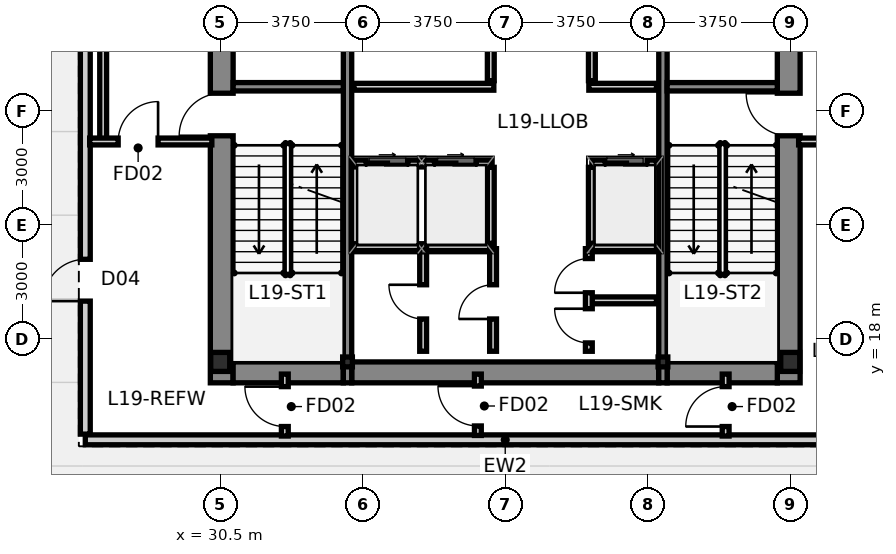
"""IFC4 building model, lengths in metres.
Left out: names, types, materials, properties, quantities, classifications, styles, units other than length and angle.
Written with IfcOpenShell. Run it as: python <this file> out.ifc"""

import sys

from ifc_helpers import new_model, si_unit, direction, frame, frame_2d, origin, origin_2d, place, context, subcontext, project, spatial, rectangle, i_section, extrude, source, transform, mapped, element, fill, save


model = new_model("IFC4")
c1 = context("Model", 3, precision=1e-05, world=origin(), true_north=direction((0.0, 1.0)))
c2 = subcontext(c1, "Body", "Model", "MODEL_VIEW")
j1 = project(units=[si_unit("LENGTHUNIT", "METRE"), si_unit("PLANEANGLEUNIT", "RADIAN")], contexts=[c1])
p1 = place(None, origin())
s1 = spatial("IfcSite", under=j1, at=p1, CompositionType="ELEMENT")
p2 = place(p1, origin())
s2 = spatial("IfcBuilding", under=s1, at=p2, CompositionType="ELEMENT")
p3 = place(p2, frame((0.0, 0.0, 75.05)))
s3 = spatial("IfcBuildingStorey", under=s2, at=p3, CompositionType="ELEMENT", Elevation=75.05)
m1 = source(origin(), c2, "Body", "SweptSolid", [
    extrude(i_section(OverallWidth=0.5, OverallDepth=0.5, WebThickness=0.028, FlangeThickness=0.04, at=origin_2d()), origin(), (0.0, 0.0, 1.0), 4.8),
])
for number, where, z_axis, x_axis in (
    (1, (30.5, 17.4, 0.0), (0.0, 0.0, 1.0), (1.0, 0.0, 0.0)),
    (2, (45.5, 17.4, 0.0), (0.0, 0.0, 1.0), (1.0, 0.0, 0.0)),
):
    element("IfcColumn", number, at=place(p3, frame(where, z_axis=z_axis, x_axis=x_axis)), inside=s3, PredefinedType="COLUMN", context=c2, shape_type="MappedRepresentation", body=[
        mapped(m1, transform((0.0, 0.0, 0.0), scale=1.0)),
    ])
m2 = source(origin(), c2, "Body", "SweptSolid", [
    extrude(i_section(OverallWidth=0.256, OverallDepth=0.26, WebThickness=0.01, FlangeThickness=0.017, at=origin_2d()), origin(), (0.0, 0.0, 1.0), 4.8),
])
for number, where, z_axis, x_axis in (
    (3, (33.85, 17.4, 0.0), (0.0, 0.0, 1.0), (1.0, 0.0, 0.0)),
    (4, (42.15, 17.4, 0.0), (0.0, 0.0, 1.0), (1.0, 0.0, 0.0)),
):
    element("IfcColumn", number, at=place(p3, frame(where, z_axis=z_axis, x_axis=x_axis)), inside=s3, PredefinedType="COLUMN", context=c2, shape_type="MappedRepresentation", body=[
        mapped(m2, transform((0.0, 0.0, 0.0), scale=1.0)),
    ])
p4 = place(p3, frame((30.54, 16.85, 0.0), z_axis=(0.0, 0.0, 1.0), x_axis=(0.0, 1.0, 0.0)))
e5 = element("IfcWall", 5, at=p4, inside=s3, PredefinedType="SHEAR", context=c2, shape_type="SweptSolid", body=[
    extrude(rectangle(XDim=13.425, YDim=0.6, at=frame_2d((6.712, 0.0))), origin(), (0.0, 0.0, 1.0), 4.8),
])
p5 = place(p4, frame((6.5, 0.0, 0.0)))
e6 = element("IfcOpeningElement", 6, at=p5, cuts=e5, PredefinedType="OPENING", context=c2, shape_type="SweptSolid", body=[
    extrude(rectangle(XDim=1.12, YDim=2.15, at=frame_2d((0.56, 1.075))), frame((0.0, 0.312, 0.0), z_axis=(0.0, -1.0, 0.0), x_axis=(1.0, 0.0, 0.0)), (0.0, 0.0, 1.0), 0.624),
])
p6 = place(p4, frame((10.95, 0.0, 0.0)))
e7 = element("IfcOpeningElement", 7, at=p6, cuts=e5, PredefinedType="OPENING", context=c2, shape_type="SweptSolid", body=[
    extrude(rectangle(XDim=1.2, YDim=2.2, at=frame_2d((0.6, 1.1))), frame((0.0, 0.312, 0.0), z_axis=(0.0, -1.0, 0.0), x_axis=(1.0, 0.0, 0.0)), (0.0, 0.0, 1.0), 0.624),
])
p7 = place(p3, frame((45.46, 16.85, 0.0), z_axis=(0.0, 0.0, 1.0), x_axis=(0.0, 1.0, 0.0)))
e8 = element("IfcWall", 8, at=p7, inside=s3, PredefinedType="SHEAR", context=c2, shape_type="SweptSolid", body=[
    extrude(rectangle(XDim=13.425, YDim=0.6, at=frame_2d((6.712, 0.0))), origin(), (0.0, 0.0, 1.0), 4.8),
])
p8 = place(p7, frame((6.5, 0.0, 0.0)))
e9 = element("IfcOpeningElement", 9, at=p8, cuts=e8, PredefinedType="OPENING", context=c2, shape_type="SweptSolid", body=[
    extrude(rectangle(XDim=1.12, YDim=2.15, at=frame_2d((0.56, 1.075))), frame((0.0, 0.312, 0.0), z_axis=(0.0, -1.0, 0.0), x_axis=(1.0, 0.0, 0.0)), (0.0, 0.0, 1.0), 0.624),
])
p9 = place(p7, frame((10.95, 0.0, 0.0)))
e10 = element("IfcOpeningElement", 10, at=p9, cuts=e8, PredefinedType="OPENING", context=c2, shape_type="SweptSolid", body=[
    extrude(rectangle(XDim=1.2, YDim=2.2, at=frame_2d((0.6, 1.1))), frame((0.0, 0.312, 0.0), z_axis=(0.0, -1.0, 0.0), x_axis=(1.0, 0.0, 0.0)), (0.0, 0.0, 1.0), 0.624),
])
p10 = place(p3, frame((30.84, 17.125, 0.0), z_axis=(0.0, 0.0, 1.0), x_axis=(1.0, 0.0, 0.0)))
e11 = element("IfcWall", 11, at=p10, inside=s3, PredefinedType="SHEAR", context=c2, shape_type="SweptSolid", body=[
    extrude(rectangle(XDim=2.9, YDim=0.55, at=frame_2d((1.45, 0.0))), origin(), (0.0, 0.0, 1.0), 4.8),
])
p11 = place(p3, frame((33.96, 17.125, 0.0), z_axis=(0.0, 0.0, 1.0), x_axis=(1.0, 0.0, 0.0)))
e12 = element("IfcWall", 12, at=p11, inside=s3, PredefinedType="SHEAR", context=c2, shape_type="SweptSolid", body=[
    extrude(rectangle(XDim=8.08, YDim=0.55, at=frame_2d((4.04, 0.0))), origin(), (0.0, 0.0, 1.0), 4.8),
])
p12 = place(p3, frame((42.26, 17.125, 0.0), z_axis=(0.0, 0.0, 1.0), x_axis=(1.0, 0.0, 0.0)))
e13 = element("IfcWall", 13, at=p12, inside=s3, PredefinedType="SHEAR", context=c2, shape_type="SweptSolid", body=[
    extrude(rectangle(XDim=2.9, YDim=0.55, at=frame_2d((1.45, 0.0))), origin(), (0.0, 0.0, 1.0), 4.8),
])
for number, where, z_axis, x_axis in (
    (14, (33.85, 16.85, 0.0), (0.0, 0.0, 1.0), (0.0, 1.0, 0.0)),
    (15, (42.15, 16.85, 0.0), (0.0, 0.0, 1.0), (0.0, 1.0, 0.0)),
):
    element("IfcWall", number, at=place(p3, frame(where, z_axis=z_axis, x_axis=x_axis)), inside=s3, PredefinedType="SHEAR", context=c2, shape_type="SweptSolid", body=[
        extrude(rectangle(XDim=13.425, YDim=0.22, at=frame_2d((6.712, 0.0))), origin(), (0.0, 0.0, 1.0), 4.8),
    ])
for number, where, z_axis, x_axis in (
    (16, (30.84, 24.64, 0.0), (0.0, 0.0, 1.0), (1.0, 0.0, 0.0)),
    (17, (42.26, 24.64, 0.0), (0.0, 0.0, 1.0), (1.0, 0.0, 0.0)),
):
    element("IfcWall", number, at=place(p3, frame(where, z_axis=z_axis, x_axis=x_axis)), inside=s3, PredefinedType="SHEAR", context=c2, shape_type="SweptSolid", body=[
        extrude(rectangle(XDim=2.9, YDim=0.22, at=frame_2d((1.45, 0.0))), origin(), (0.0, 0.0, 1.0), 4.8),
    ])
p13 = place(p3, frame((26.95, 15.35, 0.0), z_axis=(0.0, 0.0, 1.0), x_axis=(1.0, 0.0, 0.0)))
e18 = element("IfcWall", 18, at=p13, inside=s3, PredefinedType="STANDARD", context=c2, shape_type="SweptSolid", body=[
    extrude(rectangle(XDim=22.1, YDim=0.26, at=frame_2d((11.05, 0.0))), origin(), (0.0, 0.0, 1.0), 4.176),
])
p14 = place(p3, frame((26.95, 15.5, 0.0), z_axis=(0.0, 0.0, 1.0), x_axis=(0.0, 1.0, 0.0)))
e19 = element("IfcWall", 19, at=p14, inside=s3, PredefinedType="STANDARD", context=c2, shape_type="SweptSolid", body=[
    extrude(rectangle(XDim=17.0, YDim=0.26, at=frame_2d((8.5, 0.0))), origin(), (0.0, 0.0, 1.0), 4.176),
])
p15 = place(p14, frame((3.5, 0.0, 0.0)))
e20 = element("IfcOpeningElement", 20, at=p15, cuts=e19, PredefinedType="OPENING", context=c2, shape_type="SweptSolid", body=[
    extrude(rectangle(XDim=1.1, YDim=2.2, at=frame_2d((0.55, 1.1))), frame((0.0, 0.142, 0.0), z_axis=(0.0, -1.0, 0.0), x_axis=(1.0, 0.0, 0.0)), (0.0, 0.0, 1.0), 0.284),
])
p16 = place(p3, frame((34.02, 22.62, 0.0), z_axis=(0.0, 0.0, 1.0), x_axis=(1.0, 0.0, 0.0)))
e21 = element("IfcWall", 21, at=p16, inside=s3, PredefinedType="PARTITIONING", context=c2, shape_type="SweptSolid", body=[
    extrude(rectangle(XDim=3.6, YDim=0.18, at=frame_2d((1.8, 0.0))), origin(), (0.0, 0.0, 1.0), 4.55),
])
p17 = place(p16, frame((0.32, 0.0, 0.0)))
e22 = element("IfcOpeningElement", 22, at=p17, cuts=e21, PredefinedType="OPENING", context=c2, shape_type="SweptSolid", body=[
    extrude(rectangle(XDim=1.1, YDim=2.2, at=frame_2d((0.55, 1.1))), frame((0.0, 0.102, 0.0), z_axis=(0.0, -1.0, 0.0), x_axis=(1.0, 0.0, 0.0)), (0.0, 0.0, 1.0), 0.204),
])
p18 = place(p16, frame((2.12, 0.0, 0.0)))
e23 = element("IfcOpeningElement", 23, at=p18, cuts=e21, PredefinedType="OPENING", context=c2, shape_type="SweptSolid", body=[
    extrude(rectangle(XDim=1.1, YDim=2.2, at=frame_2d((0.55, 1.1))), frame((0.0, 0.102, 0.0), z_axis=(0.0, -1.0, 0.0), x_axis=(1.0, 0.0, 0.0)), (0.0, 0.0, 1.0), 0.204),
])
p19 = place(p3, frame((40.28, 22.62, 0.0), z_axis=(0.0, 0.0, 1.0), x_axis=(1.0, 0.0, 0.0)))
e24 = element("IfcWall", 24, at=p19, inside=s3, PredefinedType="PARTITIONING", context=c2, shape_type="SweptSolid", body=[
    extrude(rectangle(XDim=1.7, YDim=0.18, at=frame_2d((0.85, 0.0))), origin(), (0.0, 0.0, 1.0), 4.55),
])
p20 = place(p19, frame((0.35, 0.0, 0.0)))
e25 = element("IfcOpeningElement", 25, at=p20, cuts=e24, PredefinedType="OPENING", context=c2, shape_type="SweptSolid", body=[
    extrude(rectangle(XDim=1.1, YDim=2.2, at=frame_2d((0.55, 1.1))), frame((0.0, 0.102, 0.0), z_axis=(0.0, -1.0, 0.0), x_axis=(1.0, 0.0, 0.0)), (0.0, 0.0, 1.0), 0.204),
])
for number, where, z_axis, x_axis in (
    (26, (37.62, 20.52, 0.0), (0.0, 0.0, 1.0), (0.0, 1.0, 0.0)),
    (27, (40.28, 20.52, 0.0), (0.0, 0.0, 1.0), (0.0, 1.0, 0.0)),
    (28, (37.62, 24.8, 0.0), (0.0, 0.0, 1.0), (0.0, 1.0, 0.0)),
    (29, (40.28, 24.8, 0.0), (0.0, 0.0, 1.0), (0.0, 1.0, 0.0)),
):
    element("IfcWall", number, at=place(p3, frame(where, z_axis=z_axis, x_axis=x_axis)), inside=s3, PredefinedType="PARTITIONING", context=c2, shape_type="SweptSolid", body=[
        extrude(rectangle(XDim=2.0, YDim=0.18, at=frame_2d((1.0, 0.0))), origin(), (0.0, 0.0, 1.0), 4.55),
    ])
p21 = place(p3, frame((34.02, 24.64, 0.0), z_axis=(0.0, 0.0, 1.0), x_axis=(1.0, 0.0, 0.0)))
e30 = element("IfcWall", 30, at=p21, inside=s3, PredefinedType="PARTITIONING", context=c2, shape_type="SweptSolid", body=[
    extrude(rectangle(XDim=3.68, YDim=0.18, at=frame_2d((1.84, 0.0))), origin(), (0.0, 0.0, 1.0), 4.55),
])
p22 = place(p3, frame((40.2, 24.64, 0.0), z_axis=(0.0, 0.0, 1.0), x_axis=(1.0, 0.0, 0.0)))
e31 = element("IfcWall", 31, at=p22, inside=s3, PredefinedType="PARTITIONING", context=c2, shape_type="SweptSolid", body=[
    extrude(rectangle(XDim=1.78, YDim=0.18, at=frame_2d((0.89, 0.0))), origin(), (0.0, 0.0, 1.0), 4.55),
])
p23 = place(p3, frame((27.42, 23.2, 0.0), z_axis=(0.0, 0.0, 1.0), x_axis=(0.0, 1.0, 0.0)))
e32 = element("IfcWall", 32, at=p23, inside=s3, PredefinedType="PARTITIONING", context=c2, shape_type="SweptSolid", body=[
    extrude(rectangle(XDim=6.4, YDim=0.18, at=frame_2d((3.2, 0.0))), origin(), (0.0, 0.0, 1.0), 4.176),
])
p24 = place(p3, frame((27.065, 23.2, 0.0), z_axis=(0.0, 0.0, 1.0), x_axis=(1.0, 0.0, 0.0)))
e33 = element("IfcWall", 33, at=p24, inside=s3, PredefinedType="PARTITIONING", context=c2, shape_type="SweptSolid", body=[
    extrude(rectangle(XDim=3.215, YDim=0.18, at=frame_2d((1.607, 0.0))), origin(), (0.0, 0.0, 1.0), 4.55),
])
p25 = place(p24, frame((0.75, 0.0, 0.0)))
e34 = element("IfcOpeningElement", 34, at=p25, cuts=e33, PredefinedType="OPENING", context=c2, shape_type="SweptSolid", body=[
    extrude(rectangle(XDim=1.05, YDim=2.15, at=frame_2d((0.525, 1.075))), frame((0.0, 0.102, 0.0), z_axis=(0.0, -1.0, 0.0), x_axis=(1.0, 0.0, 0.0)), (0.0, 0.0, 1.0), 0.204),
])
p26 = place(p3, frame((45.72, 23.2, 0.0), z_axis=(0.0, 0.0, 1.0), x_axis=(1.0, 0.0, 0.0)))
e35 = element("IfcWall", 35, at=p26, inside=s3, PredefinedType="PARTITIONING", context=c2, shape_type="SweptSolid", body=[
    extrude(rectangle(XDim=3.215, YDim=0.18, at=frame_2d((1.607, 0.0))), origin(), (0.0, 0.0, 1.0), 4.55),
])
p27 = place(p26, frame((0.75, 0.0, 0.0)))
e36 = element("IfcOpeningElement", 36, at=p27, cuts=e35, PredefinedType="OPENING", context=c2, shape_type="SweptSolid", body=[
    extrude(rectangle(XDim=1.05, YDim=2.15, at=frame_2d((0.525, 1.075))), frame((0.0, 0.102, 0.0), z_axis=(0.0, -1.0, 0.0), x_axis=(1.0, 0.0, 0.0)), (0.0, 0.0, 1.0), 0.204),
])
p28 = place(p3, frame((34.02, 20.42, 0.0), z_axis=(0.0, 0.0, 1.0), x_axis=(1.0, 0.0, 0.0)))
e37 = element("IfcWall", 37, at=p28, inside=s3, PredefinedType="PARTITIONING", context=c2, shape_type="SweptSolid", body=[
    extrude(rectangle(XDim=3.64, YDim=0.18, at=frame_2d((1.82, 0.0))), origin(), (0.0, 0.0, 1.0), 4.55),
])
p29 = place(p3, frame((40.22, 20.42, 0.0), z_axis=(0.0, 0.0, 1.0), x_axis=(1.0, 0.0, 0.0)))
e38 = element("IfcWall", 38, at=p29, inside=s3, PredefinedType="PARTITIONING", context=c2, shape_type="SweptSolid", body=[
    extrude(rectangle(XDim=1.76, YDim=0.18, at=frame_2d((0.88, 0.0))), origin(), (0.0, 0.0, 1.0), 4.55),
])
p30 = place(p3, frame((35.84, 17.68, 0.0), z_axis=(0.0, 0.0, 1.0), x_axis=(0.0, 1.0, 0.0)))
e39 = element("IfcWall", 39, at=p30, inside=s3, PredefinedType="PARTITIONING", context=c2, shape_type="SweptSolid", body=[
    extrude(rectangle(XDim=2.7, YDim=0.18, at=frame_2d((1.35, 0.0))), origin(), (0.0, 0.0, 1.0), 4.55),
])
p31 = place(p30, frame((0.85, 0.0, 0.0)))
e40 = element("IfcOpeningElement", 40, at=p31, cuts=e39, PredefinedType="OPENING", context=c2, shape_type="SweptSolid", body=[
    extrude(rectangle(XDim=0.9, YDim=2.1, at=frame_2d((0.45, 1.05))), frame((0.0, 0.102, 0.0), z_axis=(0.0, -1.0, 0.0), x_axis=(1.0, 0.0, 0.0)), (0.0, 0.0, 1.0), 0.204),
])
p32 = place(p3, frame((37.68, 17.68, 0.0), z_axis=(0.0, 0.0, 1.0), x_axis=(0.0, 1.0, 0.0)))
e41 = element("IfcWall", 41, at=p32, inside=s3, PredefinedType="PARTITIONING", context=c2, shape_type="SweptSolid", body=[
    extrude(rectangle(XDim=2.7, YDim=0.18, at=frame_2d((1.35, 0.0))), origin(), (0.0, 0.0, 1.0), 4.55),
])
p33 = place(p32, frame((0.85, 0.0, 0.0)))
e42 = element("IfcOpeningElement", 42, at=p33, cuts=e41, PredefinedType="OPENING", context=c2, shape_type="SweptSolid", body=[
    extrude(rectangle(XDim=0.9, YDim=2.1, at=frame_2d((0.45, 1.05))), frame((0.0, 0.102, 0.0), z_axis=(0.0, -1.0, 0.0), x_axis=(1.0, 0.0, 0.0)), (0.0, 0.0, 1.0), 0.204),
])
p34 = place(p3, frame((40.28, 19.02, 0.0), z_axis=(0.0, 0.0, 1.0), x_axis=(1.0, 0.0, 0.0)))
e43 = element("IfcWall", 43, at=p34, inside=s3, PredefinedType="PARTITIONING", context=c2, shape_type="SweptSolid", body=[
    extrude(rectangle(XDim=1.7, YDim=0.18, at=frame_2d((0.85, 0.0))), origin(), (0.0, 0.0, 1.0), 4.55),
])
p35 = place(p3, frame((40.2, 17.68, 0.0), z_axis=(0.0, 0.0, 1.0), x_axis=(0.0, 1.0, 0.0)))
e44 = element("IfcWall", 44, at=p35, inside=s3, PredefinedType="PARTITIONING", context=c2, shape_type="SweptSolid", body=[
    extrude(rectangle(XDim=2.7, YDim=0.18, at=frame_2d((1.35, 0.0))), origin(), (0.0, 0.0, 1.0), 4.55),
])
p36 = place(p35, frame((0.22, 0.0, 0.0)))
e45 = element("IfcOpeningElement", 45, at=p36, cuts=e44, PredefinedType="OPENING", context=c2, shape_type="SweptSolid", body=[
    extrude(rectangle(XDim=0.9, YDim=2.1, at=frame_2d((0.45, 1.05))), frame((0.0, 0.102, 0.0), z_axis=(0.0, -1.0, 0.0), x_axis=(1.0, 0.0, 0.0)), (0.0, 0.0, 1.0), 0.204),
])
p37 = place(p35, frame((1.54, 0.0, 0.0)))
e46 = element("IfcOpeningElement", 46, at=p37, cuts=e44, PredefinedType="OPENING", context=c2, shape_type="SweptSolid", body=[
    extrude(rectangle(XDim=0.9, YDim=2.1, at=frame_2d((0.45, 1.05))), frame((0.0, 0.102, 0.0), z_axis=(0.0, -1.0, 0.0), x_axis=(1.0, 0.0, 0.0)), (0.0, 0.0, 1.0), 0.204),
])
p38 = place(p3, frame((32.2, 15.45, 0.0), z_axis=(0.0, 0.0, 1.0), x_axis=(0.0, 1.0, 0.0)))
e47 = element("IfcWall", 47, at=p38, inside=s3, PredefinedType="PARTITIONING", context=c2, shape_type="SweptSolid", body=[
    extrude(rectangle(XDim=1.63, YDim=0.18, at=frame_2d((0.815, 0.0))), origin(), (0.0, 0.0, 1.0), 4.55),
])
p39 = place(p38, frame((0.25, 0.0, 0.0)))
e48 = element("IfcOpeningElement", 48, at=p39, cuts=e47, PredefinedType="OPENING", context=c2, shape_type="SweptSolid", body=[
    extrude(rectangle(XDim=1.05, YDim=2.15, at=frame_2d((0.525, 1.075))), frame((0.0, 0.102, 0.0), z_axis=(0.0, -1.0, 0.0), x_axis=(1.0, 0.0, 0.0)), (0.0, 0.0, 1.0), 0.204),
])
p40 = place(p3, frame((43.8, 15.45, 0.0), z_axis=(0.0, 0.0, 1.0), x_axis=(0.0, 1.0, 0.0)))
e49 = element("IfcWall", 49, at=p40, inside=s3, PredefinedType="PARTITIONING", context=c2, shape_type="SweptSolid", body=[
    extrude(rectangle(XDim=1.63, YDim=0.18, at=frame_2d((0.815, 0.0))), origin(), (0.0, 0.0, 1.0), 4.55),
])
p41 = place(p40, frame((0.25, 0.0, 0.0)))
e50 = element("IfcOpeningElement", 50, at=p41, cuts=e49, PredefinedType="OPENING", context=c2, shape_type="SweptSolid", body=[
    extrude(rectangle(XDim=1.05, YDim=2.15, at=frame_2d((0.525, 1.075))), frame((0.0, 0.102, 0.0), z_axis=(0.0, -1.0, 0.0), x_axis=(1.0, 0.0, 0.0)), (0.0, 0.0, 1.0), 0.204),
])
p42 = place(p3, frame((37.28, 15.465, 0.0), z_axis=(0.0, 0.0, 1.0), x_axis=(0.0, 1.0, 0.0)))
e51 = element("IfcWall", 51, at=p42, inside=s3, PredefinedType="PARTITIONING", context=c2, shape_type="SweptSolid", body=[
    extrude(rectangle(XDim=1.615, YDim=0.18, at=frame_2d((0.808, 0.0))), origin(), (0.0, 0.0, 1.0), 4.55),
])
p43 = place(p42, frame((0.25, 0.0, 0.0)))
e52 = element("IfcOpeningElement", 52, at=p43, cuts=e51, PredefinedType="OPENING", context=c2, shape_type="SweptSolid", body=[
    extrude(rectangle(XDim=1.05, YDim=2.15, at=frame_2d((0.525, 1.075))), frame((0.0, 0.102, 0.0), z_axis=(0.0, -1.0, 0.0), x_axis=(1.0, 0.0, 0.0)), (0.0, 0.0, 1.0), 0.204),
])
p44 = place(p15, origin())
e53 = element("IfcDoor", 53, at=p44, inside=s3, OperationType="SINGLE_SWING_LEFT", PredefinedType="DOOR", context=c2, shape_type="SweptSolid", body=[
    extrude(rectangle(XDim=1.1, YDim=2.2, at=frame_2d((0.55, 1.1))), frame((0.0, 0.025, 0.0), z_axis=(0.0, -1.0, 0.0), x_axis=(1.0, 0.0, 0.0)), (0.0, 0.0, 1.0), 0.05),
])
fill(e20, e53)
p45 = place(p5, origin())
e54 = element("IfcDoor", 54, at=p45, inside=s3, OperationType="SINGLE_SWING_LEFT", PredefinedType="DOOR", context=c2, shape_type="SweptSolid", body=[
    extrude(rectangle(XDim=1.12, YDim=2.15, at=frame_2d((0.56, 1.075))), frame((0.0, 0.025, 0.0), z_axis=(0.0, -1.0, 0.0), x_axis=(1.0, 0.0, 0.0)), (0.0, 0.0, 1.0), 0.05),
])
fill(e6, e54)
p46 = place(p8, origin())
e55 = element("IfcDoor", 55, at=p46, inside=s3, OperationType="SINGLE_SWING_RIGHT", PredefinedType="DOOR", context=c2, shape_type="SweptSolid", body=[
    extrude(rectangle(XDim=1.12, YDim=2.15, at=frame_2d((0.56, 1.075))), frame((0.0, 0.025, 0.0), z_axis=(0.0, -1.0, 0.0), x_axis=(1.0, 0.0, 0.0)), (0.0, 0.0, 1.0), 0.05),
])
fill(e9, e55)
p47 = place(p17, origin())
e56 = element("IfcDoor", 56, at=p47, inside=s3, OperationType="SLIDING_TO_LEFT", PredefinedType="DOOR", context=c2, shape_type="SweptSolid", body=[
    extrude(rectangle(XDim=1.1, YDim=2.2, at=frame_2d((0.55, 1.1))), frame((0.0, 0.025, 0.0), z_axis=(0.0, -1.0, 0.0), x_axis=(1.0, 0.0, 0.0)), (0.0, 0.0, 1.0), 0.05),
])
fill(e22, e56)
p48 = place(p18, origin())
e57 = element("IfcDoor", 57, at=p48, inside=s3, OperationType="SLIDING_TO_RIGHT", PredefinedType="DOOR", context=c2, shape_type="SweptSolid", body=[
    extrude(rectangle(XDim=1.1, YDim=2.2, at=frame_2d((0.55, 1.1))), frame((0.0, 0.025, 0.0), z_axis=(0.0, -1.0, 0.0), x_axis=(1.0, 0.0, 0.0)), (0.0, 0.0, 1.0), 0.05),
])
fill(e23, e57)
p49 = place(p20, origin())
e58 = element("IfcDoor", 58, at=p49, inside=s3, OperationType="SLIDING_TO_LEFT", PredefinedType="DOOR", context=c2, shape_type="SweptSolid", body=[
    extrude(rectangle(XDim=1.1, YDim=2.2, at=frame_2d((0.55, 1.1))), frame((0.0, 0.025, 0.0), z_axis=(0.0, -1.0, 0.0), x_axis=(1.0, 0.0, 0.0)), (0.0, 0.0, 1.0), 0.05),
])
fill(e25, e58)
p50 = place(p25, origin())
e59 = element("IfcDoor", 59, at=p50, inside=s3, OperationType="SINGLE_SWING_RIGHT", PredefinedType="DOOR", context=c2, shape_type="SweptSolid", body=[
    extrude(rectangle(XDim=1.05, YDim=2.15, at=frame_2d((0.525, 1.075))), frame((0.0, 0.025, 0.0), z_axis=(0.0, -1.0, 0.0), x_axis=(1.0, 0.0, 0.0)), (0.0, 0.0, 1.0), 0.05),
])
fill(e34, e59)
p51 = place(p31, origin())
e60 = element("IfcDoor", 60, at=p51, inside=s3, OperationType="SINGLE_SWING_RIGHT", PredefinedType="DOOR", context=c2, shape_type="SweptSolid", body=[
    extrude(rectangle(XDim=0.9, YDim=2.1, at=frame_2d((0.45, 1.05))), frame((0.0, 0.025, 0.0), z_axis=(0.0, -1.0, 0.0), x_axis=(1.0, 0.0, 0.0)), (0.0, 0.0, 1.0), 0.05),
])
fill(e40, e60)
p52 = place(p33, origin())
e61 = element("IfcDoor", 61, at=p52, inside=s3, OperationType="SINGLE_SWING_LEFT", PredefinedType="DOOR", context=c2, shape_type="SweptSolid", body=[
    extrude(rectangle(XDim=0.9, YDim=2.1, at=frame_2d((0.45, 1.05))), frame((0.0, 0.025, 0.0), z_axis=(0.0, -1.0, 0.0), x_axis=(1.0, 0.0, 0.0)), (0.0, 0.0, 1.0), 0.05),
])
fill(e42, e61)
p53 = place(p36, origin())
e62 = element("IfcDoor", 62, at=p53, inside=s3, OperationType="SINGLE_SWING_RIGHT", PredefinedType="DOOR", context=c2, shape_type="SweptSolid", body=[
    extrude(rectangle(XDim=0.9, YDim=2.1, at=frame_2d((0.45, 1.05))), frame((0.0, 0.025, 0.0), z_axis=(0.0, -1.0, 0.0), x_axis=(1.0, 0.0, 0.0)), (0.0, 0.0, 1.0), 0.05),
])
fill(e45, e62)
p54 = place(p37, origin())
e63 = element("IfcDoor", 63, at=p54, inside=s3, OperationType="SINGLE_SWING_LEFT", PredefinedType="DOOR", context=c2, shape_type="SweptSolid", body=[
    extrude(rectangle(XDim=0.9, YDim=2.1, at=frame_2d((0.45, 1.05))), frame((0.0, 0.025, 0.0), z_axis=(0.0, -1.0, 0.0), x_axis=(1.0, 0.0, 0.0)), (0.0, 0.0, 1.0), 0.05),
])
fill(e46, e63)
p55 = place(p39, origin())
e64 = element("IfcDoor", 64, at=p55, inside=s3, OperationType="SINGLE_SWING_RIGHT", PredefinedType="DOOR", context=c2, shape_type="SweptSolid", body=[
    extrude(rectangle(XDim=1.05, YDim=2.15, at=frame_2d((0.525, 1.075))), frame((0.0, 0.025, 0.0), z_axis=(0.0, -1.0, 0.0), x_axis=(1.0, 0.0, 0.0)), (0.0, 0.0, 1.0), 0.05),
])
fill(e48, e64)
p56 = place(p41, origin())
e65 = element("IfcDoor", 65, at=p56, inside=s3, OperationType="SINGLE_SWING_LEFT", PredefinedType="DOOR", context=c2, shape_type="SweptSolid", body=[
    extrude(rectangle(XDim=1.05, YDim=2.15, at=frame_2d((0.525, 1.075))), frame((0.0, 0.025, 0.0), z_axis=(0.0, -1.0, 0.0), x_axis=(1.0, 0.0, 0.0)), (0.0, 0.0, 1.0), 0.05),
])
fill(e50, e65)
p57 = place(p43, origin())
e66 = element("IfcDoor", 66, at=p57, inside=s3, OperationType="SINGLE_SWING_RIGHT", PredefinedType="DOOR", context=c2, shape_type="SweptSolid", body=[
    extrude(rectangle(XDim=1.05, YDim=2.15, at=frame_2d((0.525, 1.075))), frame((0.0, 0.025, 0.0), z_axis=(0.0, -1.0, 0.0), x_axis=(1.0, 0.0, 0.0)), (0.0, 0.0, 1.0), 0.05),
])
fill(e52, e66)
save(model, sys.argv[1])
